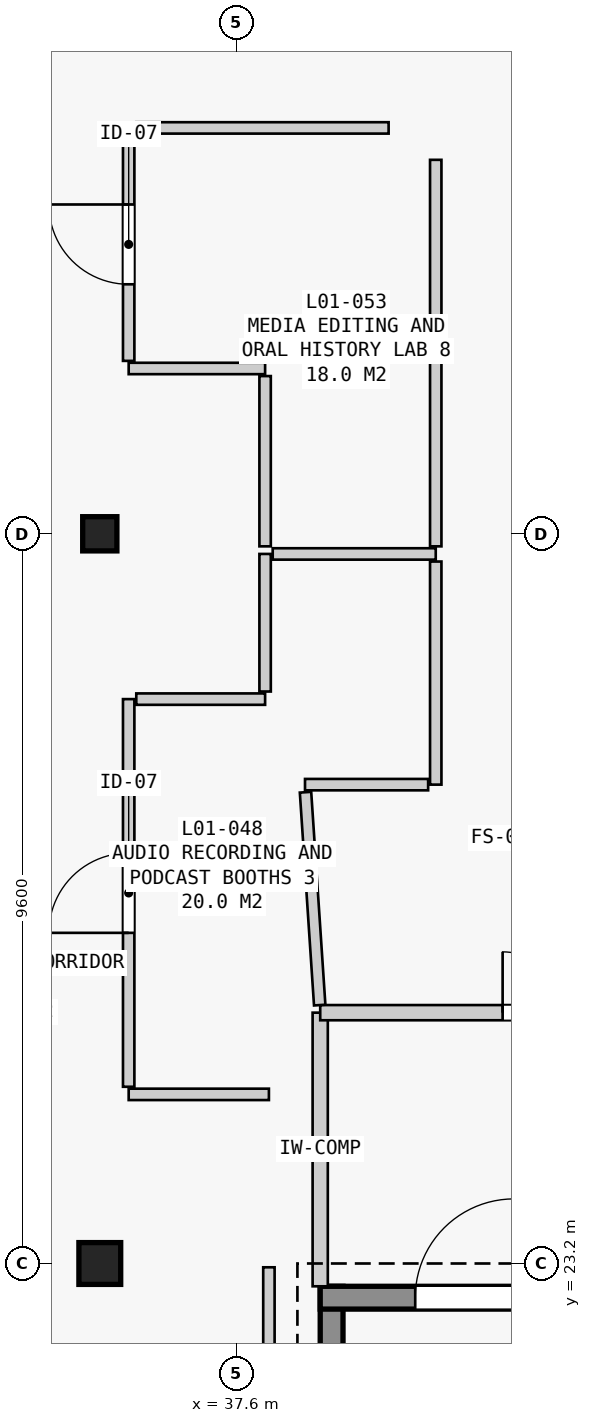
"""IFC4 building model, lengths in metres.
Left out: names, types, materials, properties, quantities, classifications, styles, units other than length and angle.
Written with IfcOpenShell. Run it as: python <this file> out.ifc"""

import sys

from ifc_helpers import new_model, si_unit, direction, frame, frame_2d, origin, origin_2d, place, context, subcontext, project, spatial, rectangle, extrude, element, fill, save


model = new_model("IFC4")
c1 = context("Model", 3, precision=1e-05, world=origin(), true_north=direction((0.0, 1.0)))
c2 = subcontext(c1, "Body", "Model", "MODEL_VIEW")
j1 = project(units=[si_unit("LENGTHUNIT", "METRE"), si_unit("PLANEANGLEUNIT", "RADIAN")], contexts=[c1])
p1 = place(None, origin())
s1 = spatial("IfcSite", under=j1, at=p1, CompositionType="ELEMENT")
p2 = place(p1, origin())
s2 = spatial("IfcBuilding", under=s1, at=p2, CompositionType="ELEMENT")
p3 = place(p2, frame((0.0, 0.0, 5.4)))
s3 = spatial("IfcBuildingStorey", under=s2, at=p3, CompositionType="ELEMENT", Elevation=5.4)
p4 = place(p3, frame((35.8, 23.2, 0.0), z_axis=(0.0, 0.0, 1.0), x_axis=(1.0, 0.0, 0.0)))
e1 = element("IfcColumn", 1, at=p4, inside=s3, PredefinedType="COLUMN", context=c2, shape_type="SweptSolid", body=[
    extrude(rectangle(XDim=0.55, YDim=0.55, at=origin_2d()), origin(), (0.0, 0.0, 1.0), 4.2),
])
p5 = place(p3, frame((35.8, 32.8, 0.0), z_axis=(0.0, 0.0, 1.0), x_axis=(1.0, 0.0, 0.0)))
e2 = element("IfcColumn", 2, at=p5, inside=s3, PredefinedType="COLUMN", context=c2, shape_type="SweptSolid", body=[
    extrude(rectangle(XDim=0.45, YDim=0.45, at=origin_2d()), origin(), (0.0, 0.0, 1.0), 4.2),
])
p6 = place(p3, frame((38.85, 14.8, 0.0), z_axis=(0.0, 0.0, 1.0), x_axis=(0.0, 1.0, 0.0)))
e3 = element("IfcWall", 3, at=p6, inside=s3, PredefinedType="SHEAR", context=c2, shape_type="SweptSolid", body=[
    extrude(rectangle(XDim=8.1, YDim=0.3, at=frame_2d((4.05, 0.0))), origin(), (0.0, 0.0, 1.0), 3.94),
])
p7 = place(p3, frame((38.7, 22.75, 0.0), z_axis=(0.0, 0.0, 1.0), x_axis=(1.0, 0.0, 0.0)))
e4 = element("IfcWall", 4, at=p7, inside=s3, PredefinedType="SHEAR", context=c2, shape_type="SweptSolid", body=[
    extrude(rectangle(XDim=6.4, YDim=0.3, at=frame_2d((3.2, 0.0))), origin(), (0.0, 0.0, 1.0), 3.94),
])
p8 = place(p7, frame((1.25, 0.0, 0.0)))
e5 = element("IfcOpeningElement", 5, at=p8, cuts=e4, PredefinedType="OPENING", context=c2, shape_type="SweptSolid", body=[
    extrude(rectangle(XDim=1.3, YDim=2.2, at=frame_2d((0.65, 1.1))), frame((0.0, 0.16, 0.0), z_axis=(0.0, -1.0, 0.0), x_axis=(1.0, 0.0, 0.0)), (0.0, 0.0, 1.0), 0.32),
])
p9 = place(p7, frame((4.45, 0.0, 0.0)))
e6 = element("IfcOpeningElement", 6, at=p9, cuts=e4, PredefinedType="OPENING", context=c2, shape_type="SweptSolid", body=[
    extrude(rectangle(XDim=1.0, YDim=2.15, at=frame_2d((0.5, 1.075))), frame((0.0, 0.16, 0.0), z_axis=(0.0, -1.0, 0.0), x_axis=(1.0, 0.0, 0.0)), (0.0, 0.0, 1.0), 0.32),
])
p10 = place(p3, frame((38.7, 22.9, 0.0), z_axis=(0.0, 0.0, 1.0), x_axis=(0.0, 1.0, 0.0)))
e7 = element("IfcWall", 7, at=p10, inside=s3, PredefinedType="STANDARD", context=c2, shape_type="SweptSolid", body=[
    extrude(rectangle(XDim=3.6, YDim=0.2, at=frame_2d((1.8, 0.0))), origin(), (0.0, 0.0, 1.0), 3.12),
])
p11 = place(p3, frame((38.7, 26.5, 0.0), z_axis=(0.0, 0.0, 1.0), x_axis=(1.0, 0.0, 0.0)))
e8 = element("IfcWall", 8, at=p11, inside=s3, PredefinedType="STANDARD", context=c2, shape_type="SweptSolid", body=[
    extrude(rectangle(XDim=6.4, YDim=0.2, at=frame_2d((3.2, 0.0))), origin(), (0.0, 0.0, 1.0), 3.42),
])
p12 = place(p11, frame((2.4, 0.0, 0.0)))
e9 = element("IfcOpeningElement", 9, at=p12, cuts=e8, PredefinedType="OPENING", context=c2, shape_type="SweptSolid", body=[
    extrude(rectangle(XDim=1.6, YDim=2.2, at=frame_2d((0.8, 1.1))), frame((0.0, 0.11, 0.0), z_axis=(0.0, -1.0, 0.0), x_axis=(1.0, 0.0, 0.0)), (0.0, 0.0, 1.0), 0.22),
])
p13 = place(p3, frame((38.025, 21.075, 0.0), z_axis=(0.0, 0.0, 1.0), x_axis=(0.0, 1.0, 0.0)))
e10 = element("IfcWall", 10, at=p13, inside=s3, PredefinedType="PARTITIONING", context=c2, shape_type="SweptSolid", body=[
    extrude(rectangle(XDim=2.075, YDim=0.15, at=frame_2d((1.038, 0.0))), origin(), (0.0, 0.0, 1.0), 3.12),
])
p14 = place(p3, frame((38.025, 25.425, 0.0), z_axis=(0.0, 0.0, 1.0), x_axis=(-1.0, 0.0, 0.0)))
e11 = element("IfcWall", 11, at=p14, inside=s3, PredefinedType="PARTITIONING", context=c2, shape_type="SweptSolid", body=[
    extrude(rectangle(XDim=1.845, YDim=0.15, at=frame_2d((0.922, 0.0))), origin(), (0.0, 0.0, 1.0), 3.94),
])
p15 = place(p3, frame((36.18, 25.525, 0.0), z_axis=(0.0, 0.0, 1.0), x_axis=(0.0, 1.0, 0.0)))
e12 = element("IfcWall", 12, at=p15, inside=s3, PredefinedType="PARTITIONING", context=c2, shape_type="SweptSolid", body=[
    extrude(rectangle(XDim=5.1, YDim=0.15, at=frame_2d((2.55, 0.0))), origin(), (0.0, 0.0, 1.0), 3.94),
])
p16 = place(p15, frame((2.025, 0.0, 0.0)))
e13 = element("IfcOpeningElement", 13, at=p16, cuts=e12, PredefinedType="OPENING", context=c2, shape_type="SweptSolid", body=[
    extrude(rectangle(XDim=1.05, YDim=2.2, at=frame_2d((0.525, 1.1))), frame((0.0, 0.085, 0.0), z_axis=(0.0, -1.0, 0.0), x_axis=(1.0, 0.0, 0.0)), (0.0, 0.0, 1.0), 0.17),
])
p17 = place(p3, frame((36.28, 30.625, 0.0), z_axis=(0.0, 0.0, 1.0), x_axis=(1.0, 0.0, 0.0)))
e14 = element("IfcWall", 14, at=p17, inside=s3, PredefinedType="PARTITIONING", context=c2, shape_type="SweptSolid", body=[
    extrude(rectangle(XDim=1.695, YDim=0.15, at=frame_2d((0.848, 0.0))), origin(), (0.0, 0.0, 1.0), 3.94),
])
p18 = place(p3, frame((37.975, 30.725, 0.0), z_axis=(0.0, 0.0, 1.0), x_axis=(0.0, 1.0, 0.0)))
e15 = element("IfcWall", 15, at=p18, inside=s3, PredefinedType="PARTITIONING", context=c2, shape_type="SweptSolid", body=[
    extrude(rectangle(XDim=1.81, YDim=0.15, at=frame_2d((0.905, 0.0))), origin(), (0.0, 0.0, 1.0), 3.94),
])
p19 = place(p3, frame((38.075, 32.535, 0.0), z_axis=(0.0, 0.0, 1.0), x_axis=(1.0, 0.0, 0.0)))
e16 = element("IfcWall", 16, at=p19, inside=s3, PredefinedType="PARTITIONING", context=c2, shape_type="SweptSolid", body=[
    extrude(rectangle(XDim=2.145, YDim=0.15, at=frame_2d((1.073, 0.0))), origin(), (0.0, 0.0, 1.0), 3.22),
])
p20 = place(p3, frame((40.22, 32.435, 0.0), z_axis=(0.0, 0.0, 1.0), x_axis=(0.0, -1.0, 0.0)))
e17 = element("IfcWall", 17, at=p20, inside=s3, PredefinedType="PARTITIONING", context=c2, shape_type="SweptSolid", body=[
    extrude(rectangle(XDim=2.935, YDim=0.15, at=frame_2d((1.468, 0.0))), origin(), (0.0, 0.0, 1.0), 3.94),
])
p21 = place(p3, frame((40.12, 29.5, 0.0), z_axis=(0.0, 0.0, 1.0), x_axis=(-1.0, 0.0, 0.0)))
e18 = element("IfcWall", 18, at=p21, inside=s3, PredefinedType="PARTITIONING", context=c2, shape_type="SweptSolid", body=[
    extrude(rectangle(XDim=1.62, YDim=0.15, at=frame_2d((0.81, 0.0))), origin(), (0.0, 0.0, 1.0), 3.94),
])
p22 = place(p3, frame((38.507, 29.4, 0.0), z_axis=(0.0, 0.0, 1.0), x_axis=(0.066547879088, -0.997783232866, 0.0)))
e19 = element("IfcWall", 19, at=p22, inside=s3, PredefinedType="PARTITIONING", context=c2, shape_type="SweptSolid", body=[
    extrude(rectangle(XDim=2.806, YDim=0.15, at=frame_2d((1.403, 0.0))), origin(), (0.0, 0.0, 1.0), 3.94),
])
p23 = place(p3, frame((37.975, 34.975, 0.0), z_axis=(0.0, 0.0, 1.0), x_axis=(-1.0, 0.0, 0.0)))
e20 = element("IfcWall", 20, at=p23, inside=s3, PredefinedType="PARTITIONING", context=c2, shape_type="SweptSolid", body=[
    extrude(rectangle(XDim=1.795, YDim=0.15, at=frame_2d((0.897, 0.0))), origin(), (0.0, 0.0, 1.0), 3.94),
])
p24 = place(p3, frame((36.18, 35.075, 0.0), z_axis=(0.0, 0.0, 1.0), x_axis=(0.0, 1.0, 0.0)))
e21 = element("IfcWall", 21, at=p24, inside=s3, PredefinedType="PARTITIONING", context=c2, shape_type="SweptSolid", body=[
    extrude(rectangle(XDim=3.065, YDim=0.15, at=frame_2d((1.532, 0.0))), origin(), (0.0, 0.0, 1.0), 3.94),
])
p25 = place(p24, frame((1.008, 0.0, 0.0)))
e22 = element("IfcOpeningElement", 22, at=p25, cuts=e21, PredefinedType="OPENING", context=c2, shape_type="SweptSolid", body=[
    extrude(rectangle(XDim=1.05, YDim=2.2, at=frame_2d((0.525, 1.1))), frame((0.0, 0.085, 0.0), z_axis=(0.0, -1.0, 0.0), x_axis=(1.0, 0.0, 0.0)), (0.0, 0.0, 1.0), 0.17),
])
p26 = place(p3, frame((36.28, 38.14, 0.0), z_axis=(0.0, 0.0, 1.0), x_axis=(1.0, 0.0, 0.0)))
e23 = element("IfcWall", 23, at=p26, inside=s3, PredefinedType="PARTITIONING", context=c2, shape_type="SweptSolid", body=[
    extrude(rectangle(XDim=3.32, YDim=0.15, at=frame_2d((1.66, 0.0))), origin(), (0.0, 0.0, 1.0), 3.94),
])
p27 = place(p3, frame((40.22, 37.72, 0.0), z_axis=(0.0, 0.0, 1.0), x_axis=(0.0, -1.0, 0.0)))
e24 = element("IfcWall", 24, at=p27, inside=s3, PredefinedType="PARTITIONING", context=c2, shape_type="SweptSolid", body=[
    extrude(rectangle(XDim=5.085, YDim=0.15, at=frame_2d((2.542, 0.0))), origin(), (0.0, 0.0, 1.0), 3.22),
])
p28 = place(p3, frame((37.975, 32.635, 0.0), z_axis=(0.0, 0.0, 1.0), x_axis=(0.0, 1.0, 0.0)))
e25 = element("IfcWall", 25, at=p28, inside=s3, PredefinedType="PARTITIONING", context=c2, shape_type="SweptSolid", body=[
    extrude(rectangle(XDim=2.24, YDim=0.15, at=frame_2d((1.12, 0.0))), origin(), (0.0, 0.0, 1.0), 3.22),
])
p29 = place(p8, origin())
e26 = element("IfcDoor", 26, at=p29, inside=s3, OperationType="SINGLE_SWING_RIGHT", PredefinedType="DOOR", context=c2, shape_type="SweptSolid", body=[
    extrude(rectangle(XDim=1.3, YDim=2.2, at=frame_2d((0.65, 1.1))), frame((0.0, 0.025, 0.0), z_axis=(0.0, -1.0, 0.0), x_axis=(1.0, 0.0, 0.0)), (0.0, 0.0, 1.0), 0.05),
])
fill(e5, e26)
p30 = place(p12, origin())
e27 = element("IfcDoor", 27, at=p30, inside=s3, OperationType="DOUBLE_DOOR_SINGLE_SWING", PredefinedType="DOOR", context=c2, shape_type="SweptSolid", body=[
    extrude(rectangle(XDim=1.6, YDim=2.2, at=frame_2d((0.8, 1.1))), frame((0.0, 0.025, 0.0), z_axis=(0.0, -1.0, 0.0), x_axis=(1.0, 0.0, 0.0)), (0.0, 0.0, 1.0), 0.05),
])
fill(e9, e27)
p31 = place(p16, origin())
e28 = element("IfcDoor", 28, at=p31, inside=s3, OperationType="SINGLE_SWING_LEFT", PredefinedType="DOOR", context=c2, shape_type="SweptSolid", body=[
    extrude(rectangle(XDim=1.05, YDim=2.2, at=frame_2d((0.525, 1.1))), frame((0.0, 0.025, 0.0), z_axis=(0.0, -1.0, 0.0), x_axis=(1.0, 0.0, 0.0)), (0.0, 0.0, 1.0), 0.05),
])
fill(e13, e28)
p32 = place(p25, origin())
e29 = element("IfcDoor", 29, at=p32, inside=s3, OperationType="SINGLE_SWING_RIGHT", PredefinedType="DOOR", context=c2, shape_type="SweptSolid", body=[
    extrude(rectangle(XDim=1.05, YDim=2.2, at=frame_2d((0.525, 1.1))), frame((0.0, 0.025, 0.0), z_axis=(0.0, -1.0, 0.0), x_axis=(1.0, 0.0, 0.0)), (0.0, 0.0, 1.0), 0.05),
])
fill(e22, e29)
save(model, sys.argv[1])
